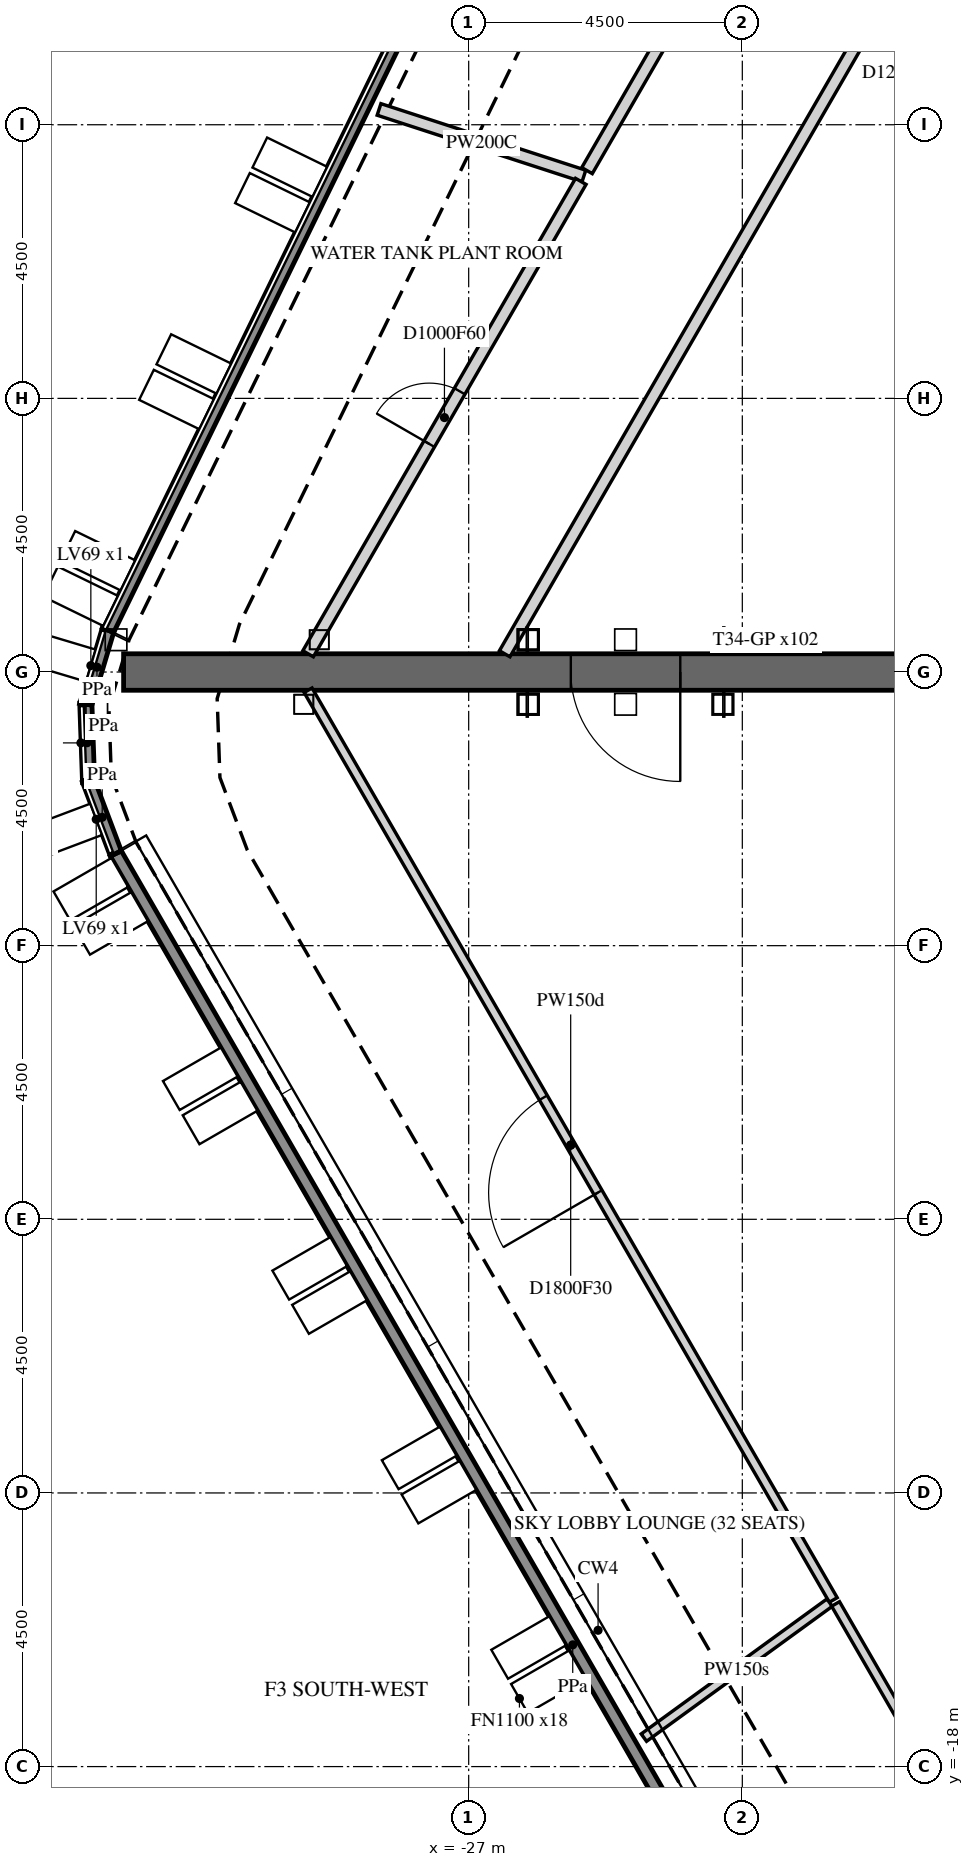
"""IFC4 building model, lengths in metres.
Left out: names, types, materials, properties, quantities, classifications, styles, units other than length and angle.
Written with IfcOpenShell. Run it as: python <this file> out.ifc"""

import sys

from ifc_helpers import new_model, si_unit, direction, frame, frame_2d, origin, place, context, subcontext, project, spatial, polyline, rectangle, outline, extrude, element, fill, save


model = new_model("IFC4")
c1 = context("Model", 3, precision=1e-05, world=origin(), true_north=direction((0.0, 1.0)))
c2 = subcontext(c1, "Body", "Model", "MODEL_VIEW")
j1 = project(units=[si_unit("LENGTHUNIT", "METRE"), si_unit("PLANEANGLEUNIT", "RADIAN")], contexts=[c1])
p1 = place(None, origin())
s1 = spatial("IfcSite", under=j1, at=p1, CompositionType="ELEMENT")
p2 = place(p1, origin())
s2 = spatial("IfcBuilding", under=s1, at=p2, CompositionType="ELEMENT")
p3 = place(p2, frame((0.0, 0.0, 146.7)))
s3 = spatial("IfcBuildingStorey", under=s2, at=p3, CompositionType="ELEMENT", Elevation=146.7)
p4 = place(p3, frame((-17.776, -29.012, 5.7), z_axis=(0.0, 0.0, 1.0), x_axis=(-0.499996465352, 0.866027444505, 0.0)))
e1 = element("IfcWall", 1, at=p4, inside=s3, PredefinedType="PARAPET", context=c2, shape_type="SweptSolid", body=[
    extrude(outline(polyline([(0.009, -0.1), (30.045, -0.1), (30.062, 0.1), (-0.009, 0.1), (0.009, -0.1)])), origin(), (0.0, 0.0, 1.0), 1.1),
])
p5 = place(p3, frame((-32.802, -2.985, 5.7), z_axis=(0.0, 0.0, 1.0), x_axis=(-0.352930531417, 0.935649528399, 0.0)))
e2 = element("IfcWall", 2, at=p5, inside=s3, PredefinedType="PARAPET", context=c2, shape_type="SweptSolid", body=[
    extrude(outline(polyline([(0.008, -0.1), (1.256, -0.1), (1.289, 0.1), (-0.008, 0.1), (0.008, -0.1)])), origin(), (0.0, 0.0, 1.0), 1.1),
])
p6 = place(p3, frame((-33.251, -1.794, 5.7), z_axis=(0.0, 0.0, 1.0), x_axis=(-0.034940984606, 0.999389377367, 0.0)))
e3 = element("IfcWall", 3, at=p6, inside=s3, PredefinedType="PARAPET", context=c2, shape_type="SweptSolid", body=[
    extrude(outline(polyline([(0.016, -0.1), (1.248, -0.1), (1.281, 0.1), (-0.016, 0.1), (0.016, -0.1)])), origin(), (0.0, 0.0, 1.0), 1.1),
])
p7 = place(p3, frame((-33.296, -0.53, 5.7), z_axis=(0.0, 0.0, 1.0), x_axis=(0.286784667578, 0.957995070156, 0.0)))
e4 = element("IfcWall", 4, at=p7, inside=s3, PredefinedType="PARAPET", context=c2, shape_type="SweptSolid", body=[
    extrude(outline(polyline([(0.016, -0.1), (1.265, -0.1), (1.281, 0.1), (-0.016, 0.1), (0.016, -0.1)])), origin(), (0.0, 0.0, 1.0), 1.1),
])
p8 = place(p3, frame((-32.931, 0.689, 5.7), z_axis=(0.0, 0.0, 1.0), x_axis=(0.438369694316, 0.898794754716, 0.0)))
e5 = element("IfcWall", 5, at=p8, inside=s3, PredefinedType="PARAPET", context=c2, shape_type="SweptSolid", body=[
    extrude(outline(polyline([(0.008, -0.1), (30.044, -0.1), (30.063, 0.1), (-0.008, 0.1), (0.008, -0.1)])), origin(), (0.0, 0.0, 1.0), 1.1),
])
p9 = place(p3, frame((-16.166, 0.0, -0.3), z_axis=(0.0, 0.0, 1.0), x_axis=(-1.0, 0.0, 0.0)))
e6 = element("IfcWall", 6, at=p9, inside=s3, PredefinedType="SHEAR", context=c2, shape_type="SweptSolid", body=[
    extrude(rectangle(XDim=16.509, YDim=0.6, at=frame_2d((8.254, 0.0))), origin(), (0.0, 0.0, 1.0), 5.8),
])
p10 = place(p9, frame((7.354, 0.0, 0.3)))
e7 = element("IfcOpeningElement", 7, at=p10, cuts=e6, PredefinedType="OPENING", context=c2, shape_type="SweptSolid", body=[
    extrude(rectangle(XDim=1.8, YDim=2.4, at=frame_2d((0.9, 1.2))), frame((0.0, 0.31, 0.0), z_axis=(0.0, -1.0, 0.0), x_axis=(1.0, 0.0, 0.0)), (0.0, 0.0, 1.0), 0.62),
])
p11 = place(p3, frame((-21.004, -15.26, 0.0), z_axis=(0.0, 0.0, 1.0), x_axis=(-0.500003019955, 0.866023660206, 0.0)))
e8 = element("IfcWall", 8, at=p11, inside=s3, PredefinedType="PARTITIONING", context=c2, shape_type="SweptSolid", body=[
    extrude(rectangle(XDim=17.274, YDim=0.15, at=frame_2d((8.637, 0.0))), origin(), (0.0, 0.0, 1.0), 5.5),
])
p12 = place(p11, frame((7.737, 0.0, 0.0)))
e9 = element("IfcOpeningElement", 9, at=p12, cuts=e8, PredefinedType="OPENING", context=c2, shape_type="SweptSolid", body=[
    extrude(rectangle(XDim=1.8, YDim=2.1, at=frame_2d((0.9, 1.05))), frame((0.0, 0.085, 0.0), z_axis=(0.0, -1.0, 0.0), x_axis=(1.0, 0.0, 0.0)), (0.0, 0.0, 1.0), 0.17),
])
p13 = place(p3, frame((-28.474, 9.252, 0.0), z_axis=(0.0, 0.0, 1.0), x_axis=(0.95105432493, -0.309023738622, 0.0)))
e10 = element("IfcWall", 10, at=p13, inside=s3, PredefinedType="PARTITIONING", context=c2, shape_type="SweptSolid", body=[
    extrude(rectangle(XDim=3.542, YDim=0.2, at=frame_2d((1.771, 0.0))), origin(), (0.0, 0.0, 1.0), 5.5),
])
p14 = place(p3, frame((-29.641, 0.3, 0.0), z_axis=(0.0, 0.0, 1.0), x_axis=(0.500005956145, 0.866021964975, 0.0)))
e11 = element("IfcWall", 11, at=p14, inside=s3, PredefinedType="PARTITIONING", context=c2, shape_type="SweptSolid", body=[
    extrude(rectangle(XDim=8.97, YDim=0.2, at=frame_2d((4.485, 0.0))), origin(), (0.0, 0.0, 1.0), 5.5),
])
p15 = place(p14, frame((3.985, 0.0, 0.0)))
e12 = element("IfcOpeningElement", 12, at=p15, cuts=e11, PredefinedType="OPENING", context=c2, shape_type="SweptSolid", body=[
    extrude(rectangle(XDim=1.0, YDim=2.1, at=frame_2d((0.5, 1.05))), frame((0.0, 0.11, 0.0), z_axis=(0.0, -1.0, 0.0), x_axis=(1.0, 0.0, 0.0)), (0.0, 0.0, 1.0), 0.22),
])
p16 = place(p3, frame((-24.119, -17.524, 0.0), z_axis=(0.0, 0.0, 1.0), x_axis=(0.808965341516, 0.587856339786, 0.0)))
e13 = element("IfcWall", 13, at=p16, inside=s3, PredefinedType="PARTITIONING", context=c2, shape_type="SweptSolid", body=[
    extrude(rectangle(XDim=3.775, YDim=0.15, at=frame_2d((1.888, 0.0))), origin(), (0.0, 0.0, 1.0), 4.573),
])
p17 = place(p3, frame((-14.907, -25.82, 0.0), z_axis=(0.0, 0.0, 1.0), x_axis=(-0.500006708318, 0.866021530701, 0.0)))
e14 = element("IfcWall", 14, at=p17, inside=s3, PredefinedType="PARTITIONING", context=c2, shape_type="SweptSolid", body=[
    extrude(rectangle(XDim=12.118, YDim=0.15, at=frame_2d((6.059, 0.0))), origin(), (0.0, 0.0, 1.0), 5.5),
])
p18 = place(p17, frame((5.159, 0.0, 0.0)))
e15 = element("IfcOpeningElement", 15, at=p18, cuts=e14, PredefinedType="OPENING", context=c2, shape_type="SweptSolid", body=[
    extrude(rectangle(XDim=1.8, YDim=2.1, at=frame_2d((0.9, 1.05))), frame((0.0, 0.085, 0.0), z_axis=(0.0, -1.0, 0.0), x_axis=(1.0, 0.0, 0.0)), (0.0, 0.0, 1.0), 0.17),
])
p19 = place(p3, frame((-25.054, 8.246, 0.0), z_axis=(0.0, 0.0, 1.0), x_axis=(0.50002892151, 0.866008705299, 0.0)))
e16 = element("IfcWall", 16, at=p19, inside=s3, PredefinedType="PARTITIONING", context=c2, shape_type="SweptSolid", body=[
    extrude(rectangle(XDim=7.999, YDim=0.2, at=frame_2d((4.0, 0.0))), origin(), (0.0, 0.0, 1.0), 5.5),
])
p20 = place(p19, frame((3.5, 0.0, 0.0)))
e17 = element("IfcOpeningElement", 17, at=p20, cuts=e16, PredefinedType="OPENING", context=c2, shape_type="SweptSolid", body=[
    extrude(rectangle(XDim=1.0, YDim=2.1, at=frame_2d((0.5, 1.05))), frame((0.0, 0.11, 0.0), z_axis=(0.0, -1.0, 0.0), x_axis=(1.0, 0.0, 0.0)), (0.0, 0.0, 1.0), 0.22),
])
p21 = place(p3, frame((-13.291, 23.02, 0.0), z_axis=(0.0, 0.0, 1.0), x_axis=(-0.499987482804, -0.86603263047, 0.0)))
e18 = element("IfcWall", 18, at=p21, inside=s3, PredefinedType="PARTITIONING", context=c2, shape_type="SweptSolid", body=[
    extrude(rectangle(XDim=26.235, YDim=0.2, at=frame_2d((13.117, 0.0))), origin(), (0.0, 0.0, 1.0), 5.5),
])
p22 = place(p21, frame((12.517, 0.0, 0.0)))
e19 = element("IfcOpeningElement", 19, at=p22, cuts=e18, PredefinedType="OPENING", context=c2, shape_type="SweptSolid", body=[
    extrude(rectangle(XDim=1.2, YDim=2.1, at=frame_2d((0.6, 1.05))), frame((0.0, 0.11, 0.0), z_axis=(0.0, -1.0, 0.0), x_axis=(1.0, 0.0, 0.0)), (0.0, 0.0, 1.0), 0.22),
])
p23 = place(p10, origin())
e20 = element("IfcDoor", 20, at=p23, inside=s3, OperationType="DOUBLE_DOOR_SINGLE_SWING", PredefinedType="DOOR", context=c2, shape_type="SweptSolid", body=[
    extrude(rectangle(XDim=1.8, YDim=2.4, at=frame_2d((0.9, 1.2))), frame((0.0, 0.025, 0.0), z_axis=(0.0, -1.0, 0.0), x_axis=(1.0, 0.0, 0.0)), (0.0, 0.0, 1.0), 0.05),
])
fill(e7, e20)
p24 = place(p12, origin())
e21 = element("IfcDoor", 21, at=p24, inside=s3, OperationType="DOUBLE_DOOR_SINGLE_SWING", PredefinedType="DOOR", context=c2, shape_type="SweptSolid", body=[
    extrude(rectangle(XDim=1.8, YDim=2.1, at=frame_2d((0.9, 1.05))), frame((0.0, 0.025, 0.0), z_axis=(0.0, -1.0, 0.0), x_axis=(1.0, 0.0, 0.0)), (0.0, 0.0, 1.0), 0.05),
])
fill(e9, e21)
p25 = place(p15, origin())
e22 = element("IfcDoor", 22, at=p25, inside=s3, OperationType="SINGLE_SWING_LEFT", PredefinedType="DOOR", context=c2, shape_type="SweptSolid", body=[
    extrude(rectangle(XDim=1.0, YDim=2.1, at=frame_2d((0.5, 1.05))), frame((0.0, 0.025, 0.0), z_axis=(0.0, -1.0, 0.0), x_axis=(1.0, 0.0, 0.0)), (0.0, 0.0, 1.0), 0.05),
])
fill(e12, e22)
save(model, sys.argv[1])
